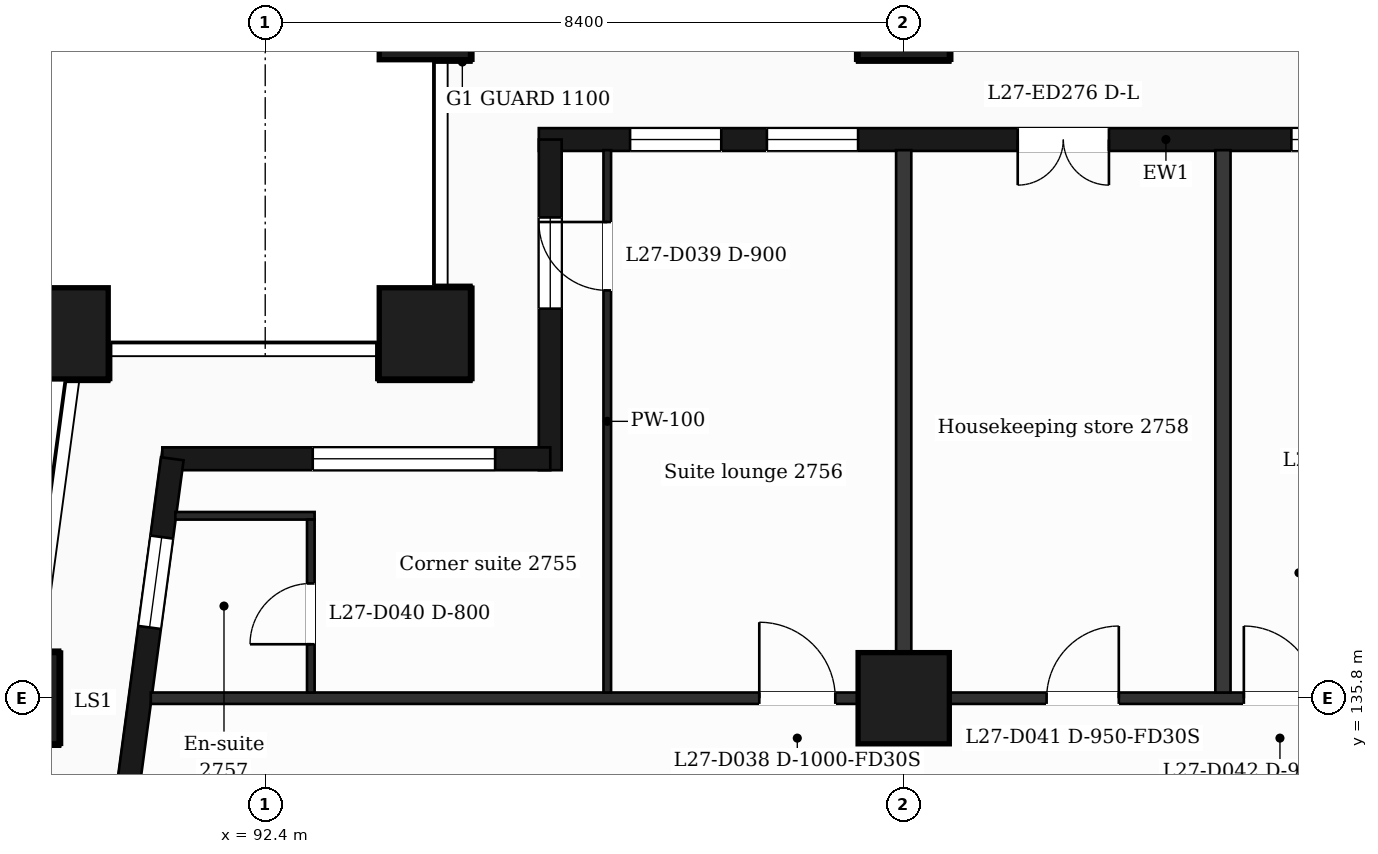
"""IFC4 building model, lengths in metres.
Left out: names, types, materials, properties, quantities, classifications, styles, units other than length and angle.
Written with IfcOpenShell. Run it as: python <this file> out.ifc"""

import sys

from ifc_helpers import new_model, si_unit, direction, frame, frame_2d, origin, origin_2d, place, context, subcontext, project, spatial, rectangle, extrude, element, fill, save


model = new_model("IFC4")
c1 = context("Model", 3, precision=1e-05, world=origin(), true_north=direction((0.0, 1.0)))
c2 = subcontext(c1, "Body", "Model", "MODEL_VIEW")
j1 = project(units=[si_unit("LENGTHUNIT", "METRE"), si_unit("PLANEANGLEUNIT", "RADIAN")], contexts=[c1])
p1 = place(None, origin())
s1 = spatial("IfcSite", under=j1, at=p1, CompositionType="ELEMENT")
p2 = place(p1, origin())
s2 = spatial("IfcBuilding", under=s1, at=p2, CompositionType="ELEMENT")
p3 = place(p2, frame((0.0, 0.0, 116.9)))
s3 = spatial("IfcBuildingStorey", under=s2, at=p3, CompositionType="ELEMENT", Elevation=116.9)
for number, where, z_axis, x_axis in (
    (1, (94.5, 140.6, 0.0), (0.0, 0.0, 1.0), (1.0, 0.0, 0.0)),
    (2, (89.735, 140.6, 0.0), (0.0, 0.0, 1.0), (1.0, 0.0, 0.0)),
    (3, (100.8, 135.8, 0.0), (0.0, 0.0, 1.0), (1.0, 0.0, 0.0)),
    (4, (89.088, 135.8, 0.0), (0.0, 0.0, 1.0), (1.0, 0.0, 0.0)),
    (5, (100.8, 144.8, 0.0), (0.0, 0.0, 1.0), (1.0, 0.0, 0.0)),
    (6, (94.5, 144.8, 0.0), (0.0, 0.0, 1.0), (1.0, 0.0, 0.0)),
):
    element("IfcColumn", number, at=place(p3, frame(where, z_axis=z_axis, x_axis=x_axis)), inside=s3, PredefinedType="COLUMN", context=c2, shape_type="SweptSolid", body=[
        extrude(rectangle(XDim=1.2, YDim=1.2, at=origin_2d()), origin(), (0.0, 0.0, 1.0), 3.7),
    ])
p4 = place(p3, frame((112.5, 143.15, 0.0), z_axis=(0.0, 0.0, 1.0), x_axis=(-1.0, 0.0, 0.0)))
e7 = element("IfcWall", 7, at=p4, inside=s3, PredefinedType="SOLIDWALL", context=c2, shape_type="SweptSolid", body=[
    extrude(rectangle(XDim=16.5, YDim=0.3, at=frame_2d((8.25, 0.0))), origin(), (0.0, 0.0, 1.0), 3.38),
])
p5 = place(p4, frame((1.1, 0.0, 0.9)))
e8 = element("IfcOpeningElement", 8, at=p5, cuts=e7, PredefinedType="OPENING", context=c2, shape_type="SweptSolid", body=[
    extrude(rectangle(XDim=1.2, YDim=2.1, at=frame_2d((0.6, 1.05))), frame((0.0, 0.16, 0.0), z_axis=(0.0, -1.0, 0.0), x_axis=(1.0, 0.0, 0.0)), (0.0, 0.0, 1.0), 0.32),
])
p6 = place(p4, frame((4.2, 0.0, 0.9)))
e9 = element("IfcOpeningElement", 9, at=p6, cuts=e7, PredefinedType="OPENING", context=c2, shape_type="SweptSolid", body=[
    extrude(rectangle(XDim=2.4, YDim=2.1, at=frame_2d((1.2, 1.05))), frame((0.0, 0.16, 0.0), z_axis=(0.0, -1.0, 0.0), x_axis=(1.0, 0.0, 0.0)), (0.0, 0.0, 1.0), 0.32),
])
p7 = place(p4, frame((9.0, 0.0, 0.0)))
e10 = element("IfcOpeningElement", 10, at=p7, cuts=e7, PredefinedType="OPENING", context=c2, shape_type="SweptSolid", body=[
    extrude(rectangle(XDim=1.2, YDim=2.4, at=frame_2d((0.6, 1.2))), frame((0.0, 0.16, 0.0), z_axis=(0.0, -1.0, 0.0), x_axis=(1.0, 0.0, 0.0)), (0.0, 0.0, 1.0), 0.32),
])
p8 = place(p4, frame((12.3, 0.0, 0.9)))
e11 = element("IfcOpeningElement", 11, at=p8, cuts=e7, PredefinedType="OPENING", context=c2, shape_type="SweptSolid", body=[
    extrude(rectangle(XDim=1.2, YDim=2.1, at=frame_2d((0.6, 1.05))), frame((0.0, 0.16, 0.0), z_axis=(0.0, -1.0, 0.0), x_axis=(1.0, 0.0, 0.0)), (0.0, 0.0, 1.0), 0.32),
])
p9 = place(p4, frame((14.1, 0.0, 0.9)))
e12 = element("IfcOpeningElement", 12, at=p9, cuts=e7, PredefinedType="OPENING", context=c2, shape_type="SweptSolid", body=[
    extrude(rectangle(XDim=1.2, YDim=2.1, at=frame_2d((0.6, 1.05))), frame((0.0, 0.16, 0.0), z_axis=(0.0, -1.0, 0.0), x_axis=(1.0, 0.0, 0.0)), (0.0, 0.0, 1.0), 0.32),
])
p10 = place(p3, frame((96.15, 143.15, 0.0), z_axis=(0.0, 0.0, 1.0), x_axis=(0.0, -1.0, 0.0)))
e13 = element("IfcWall", 13, at=p10, inside=s3, PredefinedType="SOLIDWALL", context=c2, shape_type="SweptSolid", body=[
    extrude(rectangle(XDim=4.35, YDim=0.3, at=frame_2d((2.175, 0.0))), origin(), (0.0, 0.0, 1.0), 3.38),
])
p11 = place(p10, frame((1.025, 0.0, 0.9)))
e14 = element("IfcOpeningElement", 14, at=p11, cuts=e13, PredefinedType="OPENING", context=c2, shape_type="SweptSolid", body=[
    extrude(rectangle(XDim=1.2, YDim=2.1, at=frame_2d((0.6, 1.05))), frame((0.0, 0.16, 0.0), z_axis=(0.0, -1.0, 0.0), x_axis=(1.0, 0.0, 0.0)), (0.0, 0.0, 1.0), 0.32),
])
p12 = place(p3, frame((96.15, 138.95, 0.0), z_axis=(0.0, 0.0, 1.0), x_axis=(-1.0, 0.0, 0.0)))
e15 = element("IfcWall", 15, at=p12, inside=s3, PredefinedType="SOLIDWALL", context=c2, shape_type="SweptSolid", body=[
    extrude(rectangle(XDim=5.104, YDim=0.3, at=frame_2d((2.552, 0.0))), origin(), (0.0, 0.0, 1.0), 3.38),
])
p13 = place(p12, frame((0.725, 0.0, 0.9)))
e16 = element("IfcOpeningElement", 16, at=p13, cuts=e15, PredefinedType="OPENING", context=c2, shape_type="SweptSolid", body=[
    extrude(rectangle(XDim=2.4, YDim=2.1, at=frame_2d((1.2, 1.05))), frame((0.0, 0.16, 0.0), z_axis=(0.0, -1.0, 0.0), x_axis=(1.0, 0.0, 0.0)), (0.0, 0.0, 1.0), 0.32),
])
p14 = place(p3, frame((91.177, 138.95, 0.0), z_axis=(0.0, 0.0, 1.0), x_axis=(-0.133426664613, -0.991058689065, 0.0)))
e17 = element("IfcWall", 17, at=p14, inside=s3, PredefinedType="SOLIDWALL", context=c2, shape_type="SweptSolid", body=[
    extrude(rectangle(XDim=6.609, YDim=0.3, at=frame_2d((3.305, 0.0))), origin(), (0.0, 0.0, 1.0), 3.38),
])
p15 = place(p14, frame((1.039, 0.0, 0.9)))
e18 = element("IfcOpeningElement", 18, at=p15, cuts=e17, PredefinedType="OPENING", context=c2, shape_type="SweptSolid", body=[
    extrude(rectangle(XDim=1.2, YDim=2.1, at=frame_2d((0.6, 1.05))), frame((0.0, 0.16, 0.0), z_axis=(0.0, -1.0, 0.0), x_axis=(1.0, 0.0, 0.0)), (0.0, 0.0, 1.0), 0.32),
])
p16 = place(p14, frame((4.294, 0.0, 0.0)))
e19 = element("IfcOpeningElement", 19, at=p16, cuts=e17, PredefinedType="OPENING", context=c2, shape_type="SweptSolid", body=[
    extrude(rectangle(XDim=1.2, YDim=2.4, at=frame_2d((0.6, 1.2))), frame((0.0, 0.16, 0.0), z_axis=(0.0, -1.0, 0.0), x_axis=(1.0, 0.0, 0.0)), (0.0, 0.0, 1.0), 0.32),
])
p17 = place(p3, frame((90.895, 135.8, 0.0), z_axis=(0.0, 0.0, 1.0), x_axis=(1.0, 0.0, 0.0)))
e20 = element("IfcWall", 20, at=p17, inside=s3, PredefinedType="PARTITIONING", context=c2, shape_type="SweptSolid", body=[
    extrude(rectangle(XDim=45.011, YDim=0.15, at=frame_2d((22.505, 0.0))), origin(), (0.0, 0.0, 1.0), 3.38),
])
p18 = place(p17, frame((8.005, 0.0, 0.0)))
e21 = element("IfcOpeningElement", 21, at=p18, cuts=e20, PredefinedType="OPENING", context=c2, shape_type="SweptSolid", body=[
    extrude(rectangle(XDim=1.0, YDim=2.1, at=frame_2d((0.5, 1.05))), frame((0.0, 0.085, 0.0), z_axis=(0.0, -1.0, 0.0), x_axis=(1.0, 0.0, 0.0)), (0.0, 0.0, 1.0), 0.17),
])
p19 = place(p17, frame((11.785, 0.0, 0.0)))
e22 = element("IfcOpeningElement", 22, at=p19, cuts=e20, PredefinedType="OPENING", context=c2, shape_type="SweptSolid", body=[
    extrude(rectangle(XDim=0.95, YDim=2.1, at=frame_2d((0.475, 1.05))), frame((0.0, 0.085, 0.0), z_axis=(0.0, -1.0, 0.0), x_axis=(1.0, 0.0, 0.0)), (0.0, 0.0, 1.0), 0.17),
])
p20 = place(p17, frame((14.38, 0.0, 0.0)))
e23 = element("IfcOpeningElement", 23, at=p20, cuts=e20, PredefinedType="OPENING", context=c2, shape_type="SweptSolid", body=[
    extrude(rectangle(XDim=0.95, YDim=2.1, at=frame_2d((0.475, 1.05))), frame((0.0, 0.085, 0.0), z_axis=(0.0, -1.0, 0.0), x_axis=(1.0, 0.0, 0.0)), (0.0, 0.0, 1.0), 0.17),
])
p21 = place(p17, frame((19.075, 0.0, 0.0)))
e24 = element("IfcOpeningElement", 24, at=p21, cuts=e20, PredefinedType="OPENING", context=c2, shape_type="SweptSolid", body=[
    extrude(rectangle(XDim=0.95, YDim=2.1, at=frame_2d((0.475, 1.05))), frame((0.0, 0.085, 0.0), z_axis=(0.0, -1.0, 0.0), x_axis=(1.0, 0.0, 0.0)), (0.0, 0.0, 1.0), 0.17),
])
p22 = place(p17, frame((24.855, 0.0, 0.0)))
e25 = element("IfcOpeningElement", 25, at=p22, cuts=e20, PredefinedType="OPENING", context=c2, shape_type="SweptSolid", body=[
    extrude(rectangle(XDim=1.0, YDim=2.1, at=frame_2d((0.5, 1.05))), frame((0.0, 0.085, 0.0), z_axis=(0.0, -1.0, 0.0), x_axis=(1.0, 0.0, 0.0)), (0.0, 0.0, 1.0), 0.17),
])
p23 = place(p17, frame((27.515, 0.0, 0.0)))
e26 = element("IfcOpeningElement", 26, at=p23, cuts=e20, PredefinedType="OPENING", context=c2, shape_type="SweptSolid", body=[
    extrude(rectangle(XDim=0.95, YDim=2.1, at=frame_2d((0.475, 1.05))), frame((0.0, 0.085, 0.0), z_axis=(0.0, -1.0, 0.0), x_axis=(1.0, 0.0, 0.0)), (0.0, 0.0, 1.0), 0.17),
])
p24 = place(p17, frame((33.242, 0.0, 0.0)))
e27 = element("IfcOpeningElement", 27, at=p24, cuts=e20, PredefinedType="OPENING", context=c2, shape_type="SweptSolid", body=[
    extrude(rectangle(XDim=0.95, YDim=2.1, at=frame_2d((0.475, 1.05))), frame((0.0, 0.085, 0.0), z_axis=(0.0, -1.0, 0.0), x_axis=(1.0, 0.0, 0.0)), (0.0, 0.0, 1.0), 0.17),
])
p25 = place(p17, frame((37.105, 0.0, 0.0)))
e28 = element("IfcOpeningElement", 28, at=p25, cuts=e20, PredefinedType="OPENING", context=c2, shape_type="SweptSolid", body=[
    extrude(rectangle(XDim=1.0, YDim=2.1, at=frame_2d((0.5, 1.05))), frame((0.0, 0.085, 0.0), z_axis=(0.0, -1.0, 0.0), x_axis=(1.0, 0.0, 0.0)), (0.0, 0.0, 1.0), 0.17),
])
p26 = place(p3, frame((91.218, 138.2, 0.0), z_axis=(0.0, 0.0, 1.0), x_axis=(1.0, 0.0, 0.0)))
e29 = element("IfcWall", 29, at=p26, inside=s3, PredefinedType="PARTITIONING", context=c2, shape_type="SweptSolid", body=[
    extrude(rectangle(XDim=1.832, YDim=0.1, at=frame_2d((0.916, 0.0))), origin(), (0.0, 0.0, 1.0), 3.38),
])
p27 = place(p3, frame((93.0, 135.875, 0.0), z_axis=(0.0, 0.0, 1.0), x_axis=(0.0, 1.0, 0.0)))
e30 = element("IfcWall", 30, at=p27, inside=s3, PredefinedType="PARTITIONING", context=c2, shape_type="SweptSolid", body=[
    extrude(rectangle(XDim=2.275, YDim=0.1, at=frame_2d((1.137, 0.0))), origin(), (0.0, 0.0, 1.0), 3.38),
])
p28 = place(p27, frame((0.635, 0.0, 0.0)))
e31 = element("IfcOpeningElement", 31, at=p28, cuts=e30, PredefinedType="OPENING", context=c2, shape_type="SweptSolid", body=[
    extrude(rectangle(XDim=0.8, YDim=2.1, at=frame_2d((0.4, 1.05))), frame((0.0, 0.06, 0.0), z_axis=(0.0, -1.0, 0.0), x_axis=(1.0, 0.0, 0.0)), (0.0, 0.0, 1.0), 0.12),
])
p29 = place(p3, frame((96.9, 135.875, 0.0), z_axis=(0.0, 0.0, 1.0), x_axis=(0.0, 1.0, 0.0)))
e32 = element("IfcWall", 32, at=p29, inside=s3, PredefinedType="PARTITIONING", context=c2, shape_type="SweptSolid", body=[
    extrude(rectangle(XDim=7.135, YDim=0.1, at=frame_2d((3.567, 0.0))), origin(), (0.0, 0.0, 1.0), 3.38),
])
p30 = place(p29, frame((5.29, 0.0, 0.0)))
e33 = element("IfcOpeningElement", 33, at=p30, cuts=e32, PredefinedType="OPENING", context=c2, shape_type="SweptSolid", body=[
    extrude(rectangle(XDim=0.9, YDim=2.1, at=frame_2d((0.45, 1.05))), frame((0.0, 0.06, 0.0), z_axis=(0.0, -1.0, 0.0), x_axis=(1.0, 0.0, 0.0)), (0.0, 0.0, 1.0), 0.12),
])
for number, where, z_axis, x_axis in (
    (34, (100.8, 135.875, 0.0), (0.0, 0.0, 1.0), (0.0, 1.0, 0.0)),
    (35, (105.0, 135.875, 0.0), (0.0, 0.0, 1.0), (0.0, 1.0, 0.0)),
):
    element("IfcWall", number, at=place(p3, frame(where, z_axis=z_axis, x_axis=x_axis)), inside=s3, PredefinedType="PARTITIONING", context=c2, shape_type="SweptSolid", body=[
        extrude(rectangle(XDim=7.135, YDim=0.2, at=frame_2d((3.567, 0.0))), origin(), (0.0, 0.0, 1.0), 3.38),
    ])
p31 = place(p6, origin())
e36 = element("IfcWindow", 36, at=p31, inside=s3, PartitioningType="SINGLE_PANEL", PredefinedType="WINDOW", context=c2, shape_type="SweptSolid", body=[
    extrude(rectangle(XDim=2.4, YDim=2.1, at=frame_2d((1.2, 1.05))), frame((0.0, 0.03, 0.0), z_axis=(0.0, -1.0, 0.0), x_axis=(1.0, 0.0, 0.0)), (0.0, 0.0, 1.0), 0.06),
])
fill(e9, e36)
p32 = place(p7, origin())
e37 = element("IfcDoor", 37, at=p32, inside=s3, OperationType="DOUBLE_DOOR_SINGLE_SWING", PredefinedType="DOOR", context=c2, shape_type="SweptSolid", body=[
    extrude(rectangle(XDim=1.2, YDim=2.4, at=frame_2d((0.6, 1.2))), frame((0.0, 0.025, 0.0), z_axis=(0.0, -1.0, 0.0), x_axis=(1.0, 0.0, 0.0)), (0.0, 0.0, 1.0), 0.05),
])
fill(e10, e37)
p33 = place(p8, origin())
e38 = element("IfcWindow", 38, at=p33, inside=s3, PartitioningType="SINGLE_PANEL", PredefinedType="WINDOW", context=c2, shape_type="SweptSolid", body=[
    extrude(rectangle(XDim=1.2, YDim=2.1, at=frame_2d((0.6, 1.05))), frame((0.0, 0.03, 0.0), z_axis=(0.0, -1.0, 0.0), x_axis=(1.0, 0.0, 0.0)), (0.0, 0.0, 1.0), 0.06),
])
fill(e11, e38)
p34 = place(p9, origin())
e39 = element("IfcWindow", 39, at=p34, inside=s3, PartitioningType="SINGLE_PANEL", PredefinedType="WINDOW", context=c2, shape_type="SweptSolid", body=[
    extrude(rectangle(XDim=1.2, YDim=2.1, at=frame_2d((0.6, 1.05))), frame((0.0, 0.03, 0.0), z_axis=(0.0, -1.0, 0.0), x_axis=(1.0, 0.0, 0.0)), (0.0, 0.0, 1.0), 0.06),
])
fill(e12, e39)
p35 = place(p11, origin())
e40 = element("IfcWindow", 40, at=p35, inside=s3, PartitioningType="SINGLE_PANEL", PredefinedType="WINDOW", context=c2, shape_type="SweptSolid", body=[
    extrude(rectangle(XDim=1.2, YDim=2.1, at=frame_2d((0.6, 1.05))), frame((0.0, 0.03, 0.0), z_axis=(0.0, -1.0, 0.0), x_axis=(1.0, 0.0, 0.0)), (0.0, 0.0, 1.0), 0.06),
])
fill(e14, e40)
p36 = place(p13, origin())
e41 = element("IfcWindow", 41, at=p36, inside=s3, PartitioningType="SINGLE_PANEL", PredefinedType="WINDOW", context=c2, shape_type="SweptSolid", body=[
    extrude(rectangle(XDim=2.4, YDim=2.1, at=frame_2d((1.2, 1.05))), frame((0.0, 0.03, 0.0), z_axis=(0.0, -1.0, 0.0), x_axis=(1.0, 0.0, 0.0)), (0.0, 0.0, 1.0), 0.06),
])
fill(e16, e41)
p37 = place(p15, origin())
e42 = element("IfcWindow", 42, at=p37, inside=s3, PartitioningType="SINGLE_PANEL", PredefinedType="WINDOW", context=c2, shape_type="SweptSolid", body=[
    extrude(rectangle(XDim=1.2, YDim=2.1, at=frame_2d((0.6, 1.05))), frame((0.0, 0.03, 0.0), z_axis=(0.0, -1.0, 0.0), x_axis=(1.0, 0.0, 0.0)), (0.0, 0.0, 1.0), 0.06),
])
fill(e18, e42)
p38 = place(p18, origin())
e43 = element("IfcDoor", 43, at=p38, inside=s3, OperationType="SINGLE_SWING_LEFT", PredefinedType="DOOR", context=c2, shape_type="SweptSolid", body=[
    extrude(rectangle(XDim=1.0, YDim=2.1, at=frame_2d((0.5, 1.05))), frame((0.0, 0.025, 0.0), z_axis=(0.0, -1.0, 0.0), x_axis=(1.0, 0.0, 0.0)), (0.0, 0.0, 1.0), 0.05),
])
fill(e21, e43)
p39 = place(p30, origin())
e44 = element("IfcDoor", 44, at=p39, inside=s3, OperationType="SINGLE_SWING_RIGHT", PredefinedType="DOOR", context=c2, shape_type="SweptSolid", body=[
    extrude(rectangle(XDim=0.9, YDim=2.1, at=frame_2d((0.45, 1.05))), frame((0.0, 0.025, 0.0), z_axis=(0.0, -1.0, 0.0), x_axis=(1.0, 0.0, 0.0)), (0.0, 0.0, 1.0), 0.05),
])
fill(e33, e44)
p40 = place(p28, origin())
e45 = element("IfcDoor", 45, at=p40, inside=s3, OperationType="SINGLE_SWING_LEFT", PredefinedType="DOOR", context=c2, shape_type="SweptSolid", body=[
    extrude(rectangle(XDim=0.8, YDim=2.1, at=frame_2d((0.4, 1.05))), frame((0.0, 0.025, 0.0), z_axis=(0.0, -1.0, 0.0), x_axis=(1.0, 0.0, 0.0)), (0.0, 0.0, 1.0), 0.05),
])
fill(e31, e45)
p41 = place(p19, origin())
e46 = element("IfcDoor", 46, at=p41, inside=s3, OperationType="SINGLE_SWING_RIGHT", PredefinedType="DOOR", context=c2, shape_type="SweptSolid", body=[
    extrude(rectangle(XDim=0.95, YDim=2.1, at=frame_2d((0.475, 1.05))), frame((0.0, 0.025, 0.0), z_axis=(0.0, -1.0, 0.0), x_axis=(1.0, 0.0, 0.0)), (0.0, 0.0, 1.0), 0.05),
])
fill(e22, e46)
p42 = place(p20, origin())
e47 = element("IfcDoor", 47, at=p42, inside=s3, OperationType="SINGLE_SWING_LEFT", PredefinedType="DOOR", context=c2, shape_type="SweptSolid", body=[
    extrude(rectangle(XDim=0.95, YDim=2.1, at=frame_2d((0.475, 1.05))), frame((0.0, 0.025, 0.0), z_axis=(0.0, -1.0, 0.0), x_axis=(1.0, 0.0, 0.0)), (0.0, 0.0, 1.0), 0.05),
])
fill(e23, e47)
save(model, sys.argv[1])
